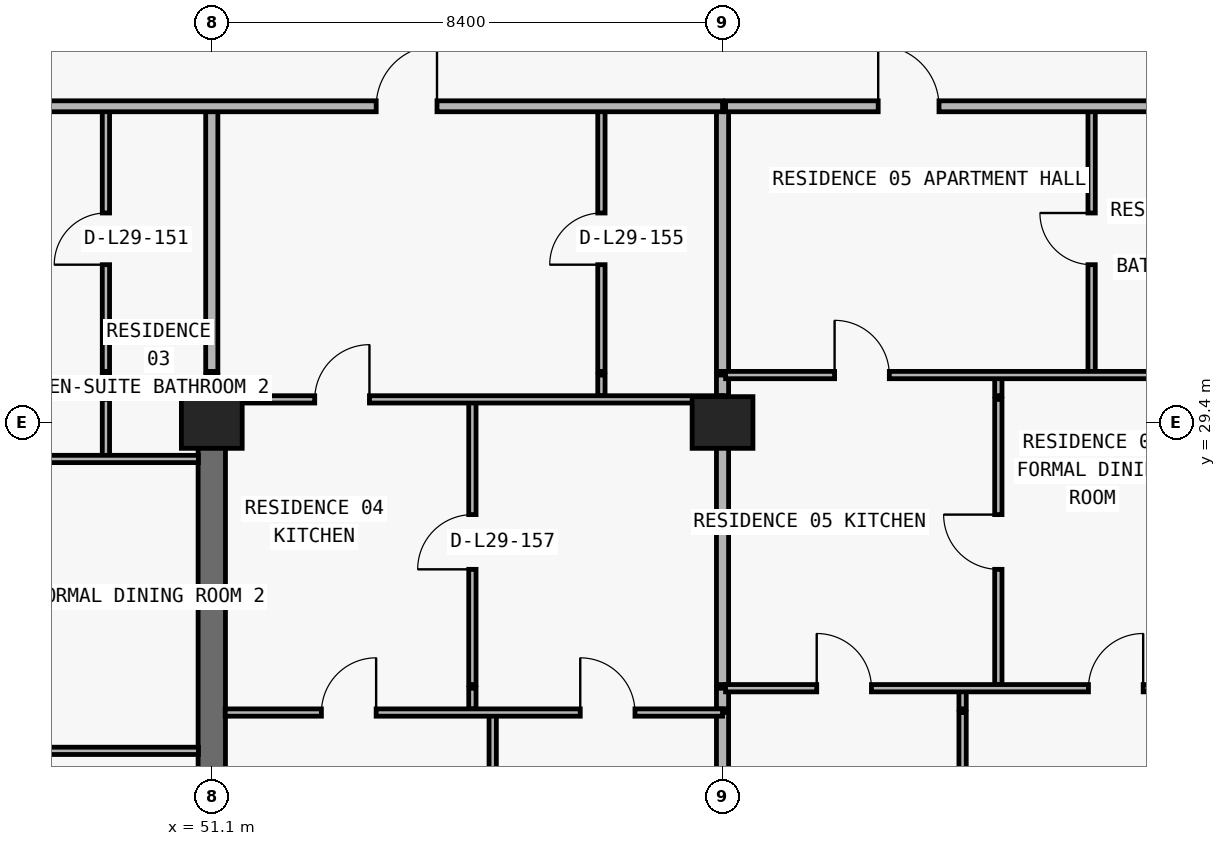
"""IFC4 building model, lengths in metres.
Left out: names, types, materials, properties, quantities, classifications, styles, units other than length and angle.
Written with IfcOpenShell. Run it as: python <this file> out.ifc"""

import sys

from ifc_helpers import new_model, si_unit, direction, frame, frame_2d, origin, origin_2d, place, context, subcontext, project, spatial, rectangle, extrude, element, fill, save


model = new_model("IFC4")
c1 = context("Model", 3, precision=1e-05, world=origin(), true_north=direction((0.0, 1.0)))
c2 = subcontext(c1, "Body", "Model", "MODEL_VIEW")
j1 = project(units=[si_unit("LENGTHUNIT", "METRE"), si_unit("PLANEANGLEUNIT", "RADIAN")], contexts=[c1])
p1 = place(None, origin())
s1 = spatial("IfcSite", under=j1, at=p1, CompositionType="ELEMENT")
p2 = place(p1, origin())
s2 = spatial("IfcBuilding", under=s1, at=p2, CompositionType="ELEMENT")
p3 = place(p2, frame((0.0, 0.0, 109.2)))
s3 = spatial("IfcBuildingStorey", under=s2, at=p3, CompositionType="ELEMENT", Elevation=109.2)
for number, where, z_axis, x_axis in (
    (1, (51.1, 29.4, 0.0), (0.0, 0.0, 1.0), (1.0, 0.0, 0.0)),
    (2, (59.5, 29.4, 0.0), (0.0, 0.0, 1.0), (1.0, 0.0, 0.0)),
):
    element("IfcColumn", number, at=place(p3, frame(where, z_axis=z_axis, x_axis=x_axis)), inside=s3, PredefinedType="COLUMN", context=c2, shape_type="SweptSolid", body=[
        extrude(rectangle(XDim=1.0, YDim=0.85, at=origin_2d()), origin(), (0.0, 0.0, 1.0), 3.05),
    ])
p4 = place(p3, frame((51.1, 20.8, 0.0), z_axis=(0.0, 0.0, 1.0), x_axis=(0.0, 1.0, 0.0)))
e3 = element("IfcWall", 3, at=p4, inside=s3, PredefinedType="SHEAR", context=c2, shape_type="SweptSolid", body=[
    extrude(rectangle(XDim=8.6, YDim=0.45, at=frame_2d((4.3, 0.0))), origin(), (0.0, 0.0, 1.0), 3.05),
])
p5 = place(p3, frame((49.359, 28.8, 0.0), z_axis=(0.0, 0.0, 1.0), x_axis=(0.0, 1.0, 0.0)))
e4 = element("IfcWall", 4, at=p5, inside=s3, PredefinedType="PARTITIONING", context=c2, shape_type="SweptSolid", body=[
    extrude(rectangle(XDim=0.98, YDim=0.12, at=frame_2d((0.49, 0.0))), origin(), (0.0, 0.0, 1.0), 3.05),
])
p6 = place(p3, frame((49.359, 29.84, 0.0), z_axis=(0.0, 0.0, 1.0), x_axis=(0.0, 1.0, 0.0)))
e5 = element("IfcWall", 5, at=p6, inside=s3, PredefinedType="PARTITIONING", context=c2, shape_type="SweptSolid", body=[
    extrude(rectangle(XDim=0.34, YDim=0.12, at=frame_2d((0.17, 0.0))), origin(), (0.0, 0.0, 1.0), 3.05),
])
p7 = place(p3, frame((49.359, 30.24, 0.0), z_axis=(0.0, 0.0, 1.0), x_axis=(0.0, 1.0, 0.0)))
e6 = element("IfcWall", 6, at=p7, inside=s3, PredefinedType="PARTITIONING", context=c2, shape_type="SweptSolid", body=[
    extrude(rectangle(XDim=4.36, YDim=0.12, at=frame_2d((2.18, 0.0))), origin(), (0.0, 0.0, 1.0), 3.05),
])
p8 = place(p7, frame((1.755, 0.0, 0.0)))
e7 = element("IfcOpeningElement", 7, at=p8, cuts=e6, PredefinedType="OPENING", context=c2, shape_type="SweptSolid", body=[
    extrude(rectangle(XDim=0.85, YDim=2.1, at=frame_2d((0.425, 1.05))), frame((0.0, 0.07, 0.0), z_axis=(0.0, -1.0, 0.0), x_axis=(1.0, 0.0, 0.0)), (0.0, 0.0, 1.0), 0.14),
])
p9 = place(p3, frame((51.1, 29.405, 0.0), z_axis=(0.0, 0.0, 1.0), x_axis=(0.0, 1.0, 0.0)))
e8 = element("IfcWall", 8, at=p9, inside=s3, PredefinedType="PARTITIONING", context=c2, shape_type="SweptSolid", body=[
    extrude(rectangle(XDim=0.375, YDim=0.2, at=frame_2d((0.188, 0.0))), origin(), (0.0, 0.0, 1.0), 3.05),
])
p10 = place(p3, frame((51.1, 29.84, 0.0), z_axis=(0.0, 0.0, 1.0), x_axis=(0.0, 1.0, 0.0)))
e9 = element("IfcWall", 9, at=p10, inside=s3, PredefinedType="PARTITIONING", context=c2, shape_type="SweptSolid", body=[
    extrude(rectangle(XDim=0.34, YDim=0.2, at=frame_2d((0.17, 0.0))), origin(), (0.0, 0.0, 1.0), 2.335),
])
p11 = place(p3, frame((51.1, 30.24, 0.0), z_axis=(0.0, 0.0, 1.0), x_axis=(0.0, 1.0, 0.0)))
e10 = element("IfcWall", 10, at=p11, inside=s3, PredefinedType="PARTITIONING", context=c2, shape_type="SweptSolid", body=[
    extrude(rectangle(XDim=4.36, YDim=0.2, at=frame_2d((2.18, 0.0))), origin(), (0.0, 0.0, 1.0), 2.335),
])
p12 = place(p3, frame((55.386, 24.69, 0.0), z_axis=(0.0, 0.0, 1.0), x_axis=(0.0, 1.0, 0.0)))
e11 = element("IfcWall", 11, at=p12, inside=s3, PredefinedType="PARTITIONING", context=c2, shape_type="SweptSolid", body=[
    extrude(rectangle(XDim=0.34, YDim=0.12, at=frame_2d((0.17, 0.0))), origin(), (0.0, 0.0, 1.0), 2.486),
])
p13 = place(p3, frame((55.386, 25.09, 0.0), z_axis=(0.0, 0.0, 1.0), x_axis=(0.0, 1.0, 0.0)))
e12 = element("IfcWall", 12, at=p13, inside=s3, PredefinedType="PARTITIONING", context=c2, shape_type="SweptSolid", body=[
    extrude(rectangle(XDim=4.69, YDim=0.12, at=frame_2d((2.345, 0.0))), origin(), (0.0, 0.0, 1.0), 2.486),
])
p14 = place(p13, frame((1.895, 0.0, 0.0)))
e13 = element("IfcOpeningElement", 13, at=p14, cuts=e12, PredefinedType="OPENING", context=c2, shape_type="SweptSolid", body=[
    extrude(rectangle(XDim=0.9, YDim=2.15, at=frame_2d((0.45, 1.075))), frame((0.0, 0.07, 0.0), z_axis=(0.0, -1.0, 0.0), x_axis=(1.0, 0.0, 0.0)), (0.0, 0.0, 1.0), 0.14),
])
p15 = place(p3, frame((55.72, 8.84, 0.0), z_axis=(0.0, 0.0, 1.0), x_axis=(0.0, 1.0, 0.0)))
e14 = element("IfcWall", 14, at=p15, inside=s3, PredefinedType="PARTITIONING", context=c2, shape_type="SweptSolid", body=[
    extrude(rectangle(XDim=15.79, YDim=0.12, at=frame_2d((7.895, 0.0))), origin(), (0.0, 0.0, 1.0), 3.05),
])
p16 = place(p3, frame((57.508, 29.84, 0.0), z_axis=(0.0, 0.0, 1.0), x_axis=(0.0, 1.0, 0.0)))
e15 = element("IfcWall", 15, at=p16, inside=s3, PredefinedType="PARTITIONING", context=c2, shape_type="SweptSolid", body=[
    extrude(rectangle(XDim=0.34, YDim=0.12, at=frame_2d((0.17, 0.0))), origin(), (0.0, 0.0, 1.0), 3.05),
])
p17 = place(p3, frame((57.508, 30.24, 0.0), z_axis=(0.0, 0.0, 1.0), x_axis=(0.0, 1.0, 0.0)))
e16 = element("IfcWall", 16, at=p17, inside=s3, PredefinedType="PARTITIONING", context=c2, shape_type="SweptSolid", body=[
    extrude(rectangle(XDim=4.36, YDim=0.12, at=frame_2d((2.18, 0.0))), origin(), (0.0, 0.0, 1.0), 3.05),
])
p18 = place(p17, frame((1.755, 0.0, 0.0)))
e17 = element("IfcOpeningElement", 17, at=p18, cuts=e16, PredefinedType="OPENING", context=c2, shape_type="SweptSolid", body=[
    extrude(rectangle(XDim=0.85, YDim=2.1, at=frame_2d((0.425, 1.05))), frame((0.0, 0.07, 0.0), z_axis=(0.0, -1.0, 0.0), x_axis=(1.0, 0.0, 0.0)), (0.0, 0.0, 1.0), 0.14),
])
p19 = place(p3, frame((59.5, 8.84, 0.0), z_axis=(0.0, 0.0, 1.0), x_axis=(0.0, 1.0, 0.0)))
e18 = element("IfcWall", 18, at=p19, inside=s3, PredefinedType="PARTITIONING", context=c2, shape_type="SweptSolid", body=[
    extrude(rectangle(XDim=15.79, YDim=0.2, at=frame_2d((7.895, 0.0))), origin(), (0.0, 0.0, 1.0), 2.174),
])
p20 = place(p3, frame((59.5, 24.69, 0.0), z_axis=(0.0, 0.0, 1.0), x_axis=(0.0, 1.0, 0.0)))
e19 = element("IfcWall", 19, at=p20, inside=s3, PredefinedType="PARTITIONING", context=c2, shape_type="SweptSolid", body=[
    extrude(rectangle(XDim=0.34, YDim=0.2, at=frame_2d((0.17, 0.0))), origin(), (0.0, 0.0, 1.0), 2.174),
])
p21 = place(p3, frame((59.5, 25.09, 0.0), z_axis=(0.0, 0.0, 1.0), x_axis=(0.0, 1.0, 0.0)))
e20 = element("IfcWall", 20, at=p21, inside=s3, PredefinedType="PARTITIONING", context=c2, shape_type="SweptSolid", body=[
    extrude(rectangle(XDim=4.69, YDim=0.2, at=frame_2d((2.345, 0.0))), origin(), (0.0, 0.0, 1.0), 2.174),
])
p22 = place(p3, frame((59.5, 29.84, 0.0), z_axis=(0.0, 0.0, 1.0), x_axis=(0.0, 1.0, 0.0)))
e21 = element("IfcWall", 21, at=p22, inside=s3, PredefinedType="PARTITIONING", context=c2, shape_type="SweptSolid", body=[
    extrude(rectangle(XDim=0.34, YDim=0.2, at=frame_2d((0.17, 0.0))), origin(), (0.0, 0.0, 1.0), 2.174),
])
p23 = place(p3, frame((59.5, 30.24, 0.0), z_axis=(0.0, 0.0, 1.0), x_axis=(0.0, 1.0, 0.0)))
e22 = element("IfcWall", 22, at=p23, inside=s3, PredefinedType="PARTITIONING", context=c2, shape_type="SweptSolid", body=[
    extrude(rectangle(XDim=4.36, YDim=0.2, at=frame_2d((2.18, 0.0))), origin(), (0.0, 0.0, 1.0), 2.174),
])
p24 = place(p3, frame((63.448, 8.84, 0.0), z_axis=(0.0, 0.0, 1.0), x_axis=(0.0, 1.0, 0.0)))
e23 = element("IfcWall", 23, at=p24, inside=s3, PredefinedType="PARTITIONING", context=c2, shape_type="SweptSolid", body=[
    extrude(rectangle(XDim=15.79, YDim=0.12, at=frame_2d((7.895, 0.0))), origin(), (0.0, 0.0, 1.0), 3.05),
])
p25 = place(p3, frame((63.448, 24.69, 0.0), z_axis=(0.0, 0.0, 1.0), x_axis=(0.0, 1.0, 0.0)))
e24 = element("IfcWall", 24, at=p25, inside=s3, PredefinedType="PARTITIONING", context=c2, shape_type="SweptSolid", body=[
    extrude(rectangle(XDim=0.34, YDim=0.12, at=frame_2d((0.17, 0.0))), origin(), (0.0, 0.0, 1.0), 3.05),
])
p26 = place(p3, frame((64.036, 25.09, 0.0), z_axis=(0.0, 0.0, 1.0), x_axis=(0.0, 1.0, 0.0)))
e25 = element("IfcWall", 25, at=p26, inside=s3, PredefinedType="PARTITIONING", context=c2, shape_type="SweptSolid", body=[
    extrude(rectangle(XDim=4.69, YDim=0.12, at=frame_2d((2.345, 0.0))), origin(), (0.0, 0.0, 1.0), 3.05),
])
p27 = place(p26, frame((1.895, 0.0, 0.0)))
e26 = element("IfcOpeningElement", 26, at=p27, cuts=e25, PredefinedType="OPENING", context=c2, shape_type="SweptSolid", body=[
    extrude(rectangle(XDim=0.9, YDim=2.15, at=frame_2d((0.45, 1.075))), frame((0.0, 0.07, 0.0), z_axis=(0.0, -1.0, 0.0), x_axis=(1.0, 0.0, 0.0)), (0.0, 0.0, 1.0), 0.14),
])
p28 = place(p3, frame((64.036, 29.84, 0.0), z_axis=(0.0, 0.0, 1.0), x_axis=(0.0, 1.0, 0.0)))
e27 = element("IfcWall", 27, at=p28, inside=s3, PredefinedType="PARTITIONING", context=c2, shape_type="SweptSolid", body=[
    extrude(rectangle(XDim=0.34, YDim=0.12, at=frame_2d((0.17, 0.0))), origin(), (0.0, 0.0, 1.0), 3.05),
])
p29 = place(p3, frame((65.57, 30.24, 0.0), z_axis=(0.0, 0.0, 1.0), x_axis=(0.0, 1.0, 0.0)))
e28 = element("IfcWall", 28, at=p29, inside=s3, PredefinedType="PARTITIONING", context=c2, shape_type="SweptSolid", body=[
    extrude(rectangle(XDim=4.36, YDim=0.12, at=frame_2d((2.18, 0.0))), origin(), (0.0, 0.0, 1.0), 3.05),
])
p30 = place(p29, frame((1.755, 0.0, 0.0)))
e29 = element("IfcOpeningElement", 29, at=p30, cuts=e28, PredefinedType="OPENING", context=c2, shape_type="SweptSolid", body=[
    extrude(rectangle(XDim=0.85, YDim=2.1, at=frame_2d((0.425, 1.05))), frame((0.0, 0.07, 0.0), z_axis=(0.0, -1.0, 0.0), x_axis=(1.0, 0.0, 0.0)), (0.0, 0.0, 1.0), 0.14),
])
p31 = place(p3, frame((42.7, 24.0, 0.0), z_axis=(0.0, 0.0, 1.0), x_axis=(1.0, 0.0, 0.0)))
e30 = element("IfcWall", 30, at=p31, inside=s3, PredefinedType="PARTITIONING", context=c2, shape_type="SweptSolid", body=[
    extrude(rectangle(XDim=8.18, YDim=0.12, at=frame_2d((4.09, 0.0))), origin(), (0.0, 0.0, 1.0), 3.05),
])
p32 = place(p31, frame((3.64, 0.0, 0.0)))
e31 = element("IfcOpeningElement", 31, at=p32, cuts=e30, PredefinedType="OPENING", context=c2, shape_type="SweptSolid", body=[
    extrude(rectangle(XDim=0.9, YDim=2.15, at=frame_2d((0.45, 1.075))), frame((0.0, 0.07, 0.0), z_axis=(0.0, -1.0, 0.0), x_axis=(1.0, 0.0, 0.0)), (0.0, 0.0, 1.0), 0.14),
])
p33 = place(p3, frame((51.32, 24.63, 0.0), z_axis=(0.0, 0.0, 1.0), x_axis=(1.0, 0.0, 0.0)))
e32 = element("IfcWall", 32, at=p33, inside=s3, PredefinedType="PARTITIONING", context=c2, shape_type="SweptSolid", body=[
    extrude(rectangle(XDim=8.18, YDim=0.12, at=frame_2d((4.09, 0.0))), origin(), (0.0, 0.0, 1.0), 3.05),
])
p34 = place(p33, frame((1.583, 0.0, 0.0)))
e33 = element("IfcOpeningElement", 33, at=p34, cuts=e32, PredefinedType="OPENING", context=c2, shape_type="SweptSolid", body=[
    extrude(rectangle(XDim=0.9, YDim=2.15, at=frame_2d((0.45, 1.075))), frame((0.0, 0.07, 0.0), z_axis=(0.0, -1.0, 0.0), x_axis=(1.0, 0.0, 0.0)), (0.0, 0.0, 1.0), 0.14),
])
p35 = place(p33, frame((5.84, 0.0, 0.0)))
e34 = element("IfcOpeningElement", 34, at=p35, cuts=e32, PredefinedType="OPENING", context=c2, shape_type="SweptSolid", body=[
    extrude(rectangle(XDim=0.9, YDim=2.15, at=frame_2d((0.45, 1.075))), frame((0.0, 0.07, 0.0), z_axis=(0.0, -1.0, 0.0), x_axis=(1.0, 0.0, 0.0)), (0.0, 0.0, 1.0), 0.14),
])
p36 = place(p3, frame((59.55, 25.03, 0.0), z_axis=(0.0, 0.0, 1.0), x_axis=(1.0, 0.0, 0.0)))
e35 = element("IfcWall", 35, at=p36, inside=s3, PredefinedType="PARTITIONING", context=c2, shape_type="SweptSolid", body=[
    extrude(rectangle(XDim=8.35, YDim=0.12, at=frame_2d((4.175, 0.0))), origin(), (0.0, 0.0, 1.0), 3.05),
])
p37 = place(p36, frame((1.499, 0.0, 0.0)))
e36 = element("IfcOpeningElement", 36, at=p37, cuts=e35, PredefinedType="OPENING", context=c2, shape_type="SweptSolid", body=[
    extrude(rectangle(XDim=0.9, YDim=2.15, at=frame_2d((0.45, 1.075))), frame((0.0, 0.07, 0.0), z_axis=(0.0, -1.0, 0.0), x_axis=(1.0, 0.0, 0.0)), (0.0, 0.0, 1.0), 0.14),
])
p38 = place(p36, frame((5.968, 0.0, 0.0)))
e37 = element("IfcOpeningElement", 37, at=p38, cuts=e35, PredefinedType="OPENING", context=c2, shape_type="SweptSolid", body=[
    extrude(rectangle(XDim=0.9, YDim=2.15, at=frame_2d((0.45, 1.075))), frame((0.0, 0.07, 0.0), z_axis=(0.0, -1.0, 0.0), x_axis=(1.0, 0.0, 0.0)), (0.0, 0.0, 1.0), 0.14),
])
p39 = place(p3, frame((42.705, 28.8, 0.0), z_axis=(0.0, 0.0, 1.0), x_axis=(1.0, 0.0, 0.0)))
e38 = element("IfcWall", 38, at=p39, inside=s3, PredefinedType="PARTITIONING", context=c2, shape_type="SweptSolid", body=[
    extrude(rectangle(XDim=8.175, YDim=0.12, at=frame_2d((4.087, 0.0))), origin(), (0.0, 0.0, 1.0), 3.05),
])
p40 = place(p39, frame((2.877, 0.0, 0.0)))
e39 = element("IfcOpeningElement", 39, at=p40, cuts=e38, PredefinedType="OPENING", context=c2, shape_type="SweptSolid", body=[
    extrude(rectangle(XDim=0.9, YDim=2.15, at=frame_2d((0.45, 1.075))), frame((0.0, 0.07, 0.0), z_axis=(0.0, -1.0, 0.0), x_axis=(1.0, 0.0, 0.0)), (0.0, 0.0, 1.0), 0.14),
])
p41 = place(p3, frame((51.1, 29.78, 0.0), z_axis=(0.0, 0.0, 1.0), x_axis=(1.0, 0.0, 0.0)))
e40 = element("IfcWall", 40, at=p41, inside=s3, PredefinedType="PARTITIONING", context=c2, shape_type="SweptSolid", body=[
    extrude(rectangle(XDim=8.4, YDim=0.12, at=frame_2d((4.2, 0.0))), origin(), (0.0, 0.0, 1.0), 3.05),
])
p42 = place(p41, frame((1.693, 0.0, 0.0)))
e41 = element("IfcOpeningElement", 41, at=p42, cuts=e40, PredefinedType="OPENING", context=c2, shape_type="SweptSolid", body=[
    extrude(rectangle(XDim=0.9, YDim=2.15, at=frame_2d((0.45, 1.075))), frame((0.0, 0.07, 0.0), z_axis=(0.0, -1.0, 0.0), x_axis=(1.0, 0.0, 0.0)), (0.0, 0.0, 1.0), 0.14),
])
p43 = place(p3, frame((59.55, 30.18, 0.0), z_axis=(0.0, 0.0, 1.0), x_axis=(1.0, 0.0, 0.0)))
e42 = element("IfcWall", 42, at=p43, inside=s3, PredefinedType="PARTITIONING", context=c2, shape_type="SweptSolid", body=[
    extrude(rectangle(XDim=8.35, YDim=0.12, at=frame_2d((4.175, 0.0))), origin(), (0.0, 0.0, 1.0), 3.05),
])
p44 = place(p43, frame((1.793, 0.0, 0.0)))
e43 = element("IfcOpeningElement", 43, at=p44, cuts=e42, PredefinedType="OPENING", context=c2, shape_type="SweptSolid", body=[
    extrude(rectangle(XDim=0.9, YDim=2.15, at=frame_2d((0.45, 1.075))), frame((0.0, 0.07, 0.0), z_axis=(0.0, -1.0, 0.0), x_axis=(1.0, 0.0, 0.0)), (0.0, 0.0, 1.0), 0.14),
])
p45 = place(p3, frame((26.7, 34.6, 0.0), z_axis=(0.0, 0.0, 1.0), x_axis=(1.0, 0.0, 0.0)))
e44 = element("IfcWall", 44, at=p45, inside=s3, PredefinedType="PARTITIONING", context=c2, shape_type="SweptSolid", body=[
    extrude(rectangle(XDim=32.8, YDim=0.18, at=frame_2d((16.4, 0.0))), origin(), (0.0, 0.0, 1.0), 3.05),
])
p46 = place(p45, frame((2.812, 0.0, 0.0)))
e45 = element("IfcOpeningElement", 45, at=p46, cuts=e44, PredefinedType="OPENING", context=c2, shape_type="SweptSolid", body=[
    extrude(rectangle(XDim=1.0, YDim=2.2, at=frame_2d((0.5, 1.1))), frame((0.0, 0.1, 0.0), z_axis=(0.0, -1.0, 0.0), x_axis=(1.0, 0.0, 0.0)), (0.0, 0.0, 1.0), 0.2),
])
p47 = place(p45, frame((27.104, 0.0, 0.0)))
e46 = element("IfcOpeningElement", 46, at=p47, cuts=e44, PredefinedType="OPENING", context=c2, shape_type="SweptSolid", body=[
    extrude(rectangle(XDim=1.0, YDim=2.2, at=frame_2d((0.5, 1.1))), frame((0.0, 0.1, 0.0), z_axis=(0.0, -1.0, 0.0), x_axis=(1.0, 0.0, 0.0)), (0.0, 0.0, 1.0), 0.2),
])
p48 = place(p3, frame((59.55, 34.6, 0.0), z_axis=(0.0, 0.0, 1.0), x_axis=(1.0, 0.0, 0.0)))
e47 = element("IfcWall", 47, at=p48, inside=s3, PredefinedType="PARTITIONING", context=c2, shape_type="SweptSolid", body=[
    extrude(rectangle(XDim=10.55, YDim=0.18, at=frame_2d((5.275, 0.0))), origin(), (0.0, 0.0, 1.0), 3.05),
])
p49 = place(p48, frame((2.51, 0.0, 0.0)))
e48 = element("IfcOpeningElement", 48, at=p49, cuts=e47, PredefinedType="OPENING", context=c2, shape_type="SweptSolid", body=[
    extrude(rectangle(XDim=1.0, YDim=2.2, at=frame_2d((0.5, 1.1))), frame((0.0, 0.1, 0.0), z_axis=(0.0, -1.0, 0.0), x_axis=(1.0, 0.0, 0.0)), (0.0, 0.0, 1.0), 0.2),
])
p50 = place(p8, origin())
e49 = element("IfcDoor", 49, at=p50, inside=s3, OperationType="SINGLE_SWING_LEFT", PredefinedType="DOOR", context=c2, shape_type="SweptSolid", body=[
    extrude(rectangle(XDim=0.85, YDim=2.1, at=frame_2d((0.425, 1.05))), frame((0.0, 0.025, 0.0), z_axis=(0.0, -1.0, 0.0), x_axis=(1.0, 0.0, 0.0)), (0.0, 0.0, 1.0), 0.05),
])
fill(e7, e49)
p51 = place(p47, origin())
e50 = element("IfcDoor", 50, at=p51, inside=s3, OperationType="SINGLE_SWING_RIGHT", PredefinedType="DOOR", context=c2, shape_type="SweptSolid", body=[
    extrude(rectangle(XDim=1.0, YDim=2.2, at=frame_2d((0.5, 1.1))), frame((0.0, 0.025, 0.0), z_axis=(0.0, -1.0, 0.0), x_axis=(1.0, 0.0, 0.0)), (0.0, 0.0, 1.0), 0.05),
])
fill(e46, e50)
p52 = place(p18, origin())
e51 = element("IfcDoor", 51, at=p52, inside=s3, OperationType="SINGLE_SWING_LEFT", PredefinedType="DOOR", context=c2, shape_type="SweptSolid", body=[
    extrude(rectangle(XDim=0.85, YDim=2.1, at=frame_2d((0.425, 1.05))), frame((0.0, 0.025, 0.0), z_axis=(0.0, -1.0, 0.0), x_axis=(1.0, 0.0, 0.0)), (0.0, 0.0, 1.0), 0.05),
])
fill(e17, e51)
p53 = place(p42, origin())
e52 = element("IfcDoor", 52, at=p53, inside=s3, OperationType="SINGLE_SWING_RIGHT", PredefinedType="DOOR", context=c2, shape_type="SweptSolid", body=[
    extrude(rectangle(XDim=0.9, YDim=2.15, at=frame_2d((0.45, 1.075))), frame((0.0, 0.025, 0.0), z_axis=(0.0, -1.0, 0.0), x_axis=(1.0, 0.0, 0.0)), (0.0, 0.0, 1.0), 0.05),
])
fill(e41, e52)
p54 = place(p14, origin())
e53 = element("IfcDoor", 53, at=p54, inside=s3, OperationType="SINGLE_SWING_LEFT", PredefinedType="DOOR", context=c2, shape_type="SweptSolid", body=[
    extrude(rectangle(XDim=0.9, YDim=2.15, at=frame_2d((0.45, 1.075))), frame((0.0, 0.025, 0.0), z_axis=(0.0, -1.0, 0.0), x_axis=(1.0, 0.0, 0.0)), (0.0, 0.0, 1.0), 0.05),
])
fill(e13, e53)
p55 = place(p34, origin())
e54 = element("IfcDoor", 54, at=p55, inside=s3, OperationType="SINGLE_SWING_RIGHT", PredefinedType="DOOR", context=c2, shape_type="SweptSolid", body=[
    extrude(rectangle(XDim=0.9, YDim=2.15, at=frame_2d((0.45, 1.075))), frame((0.0, 0.025, 0.0), z_axis=(0.0, -1.0, 0.0), x_axis=(1.0, 0.0, 0.0)), (0.0, 0.0, 1.0), 0.05),
])
fill(e33, e54)
p56 = place(p35, origin())
e55 = element("IfcDoor", 55, at=p56, inside=s3, OperationType="SINGLE_SWING_LEFT", PredefinedType="DOOR", context=c2, shape_type="SweptSolid", body=[
    extrude(rectangle(XDim=0.9, YDim=2.15, at=frame_2d((0.45, 1.075))), frame((0.0, 0.025, 0.0), z_axis=(0.0, -1.0, 0.0), x_axis=(1.0, 0.0, 0.0)), (0.0, 0.0, 1.0), 0.05),
])
fill(e34, e55)
p57 = place(p49, origin())
e56 = element("IfcDoor", 56, at=p57, inside=s3, OperationType="SINGLE_SWING_LEFT", PredefinedType="DOOR", context=c2, shape_type="SweptSolid", body=[
    extrude(rectangle(XDim=1.0, YDim=2.2, at=frame_2d((0.5, 1.1))), frame((0.0, 0.025, 0.0), z_axis=(0.0, -1.0, 0.0), x_axis=(1.0, 0.0, 0.0)), (0.0, 0.0, 1.0), 0.05),
])
fill(e48, e56)
p58 = place(p30, origin())
e57 = element("IfcDoor", 57, at=p58, inside=s3, OperationType="SINGLE_SWING_RIGHT", PredefinedType="DOOR", context=c2, shape_type="SweptSolid", body=[
    extrude(rectangle(XDim=0.85, YDim=2.1, at=frame_2d((0.425, 1.05))), frame((0.0, 0.025, 0.0), z_axis=(0.0, -1.0, 0.0), x_axis=(1.0, 0.0, 0.0)), (0.0, 0.0, 1.0), 0.05),
])
fill(e29, e57)
p59 = place(p44, origin())
e58 = element("IfcDoor", 58, at=p59, inside=s3, OperationType="SINGLE_SWING_LEFT", PredefinedType="DOOR", context=c2, shape_type="SweptSolid", body=[
    extrude(rectangle(XDim=0.9, YDim=2.15, at=frame_2d((0.45, 1.075))), frame((0.0, 0.025, 0.0), z_axis=(0.0, -1.0, 0.0), x_axis=(1.0, 0.0, 0.0)), (0.0, 0.0, 1.0), 0.05),
])
fill(e43, e58)
p60 = place(p27, origin())
e59 = element("IfcDoor", 59, at=p60, inside=s3, OperationType="SINGLE_SWING_RIGHT", PredefinedType="DOOR", context=c2, shape_type="SweptSolid", body=[
    extrude(rectangle(XDim=0.9, YDim=2.15, at=frame_2d((0.45, 1.075))), frame((0.0, 0.025, 0.0), z_axis=(0.0, -1.0, 0.0), x_axis=(1.0, 0.0, 0.0)), (0.0, 0.0, 1.0), 0.05),
])
fill(e26, e59)
p61 = place(p37, origin())
e60 = element("IfcDoor", 60, at=p61, inside=s3, OperationType="SINGLE_SWING_LEFT", PredefinedType="DOOR", context=c2, shape_type="SweptSolid", body=[
    extrude(rectangle(XDim=0.9, YDim=2.15, at=frame_2d((0.45, 1.075))), frame((0.0, 0.025, 0.0), z_axis=(0.0, -1.0, 0.0), x_axis=(1.0, 0.0, 0.0)), (0.0, 0.0, 1.0), 0.05),
])
fill(e36, e60)
p62 = place(p38, origin())
e61 = element("IfcDoor", 61, at=p62, inside=s3, OperationType="SINGLE_SWING_RIGHT", PredefinedType="DOOR", context=c2, shape_type="SweptSolid", body=[
    extrude(rectangle(XDim=0.9, YDim=2.15, at=frame_2d((0.45, 1.075))), frame((0.0, 0.025, 0.0), z_axis=(0.0, -1.0, 0.0), x_axis=(1.0, 0.0, 0.0)), (0.0, 0.0, 1.0), 0.05),
])
fill(e37, e61)
save(model, sys.argv[1])
